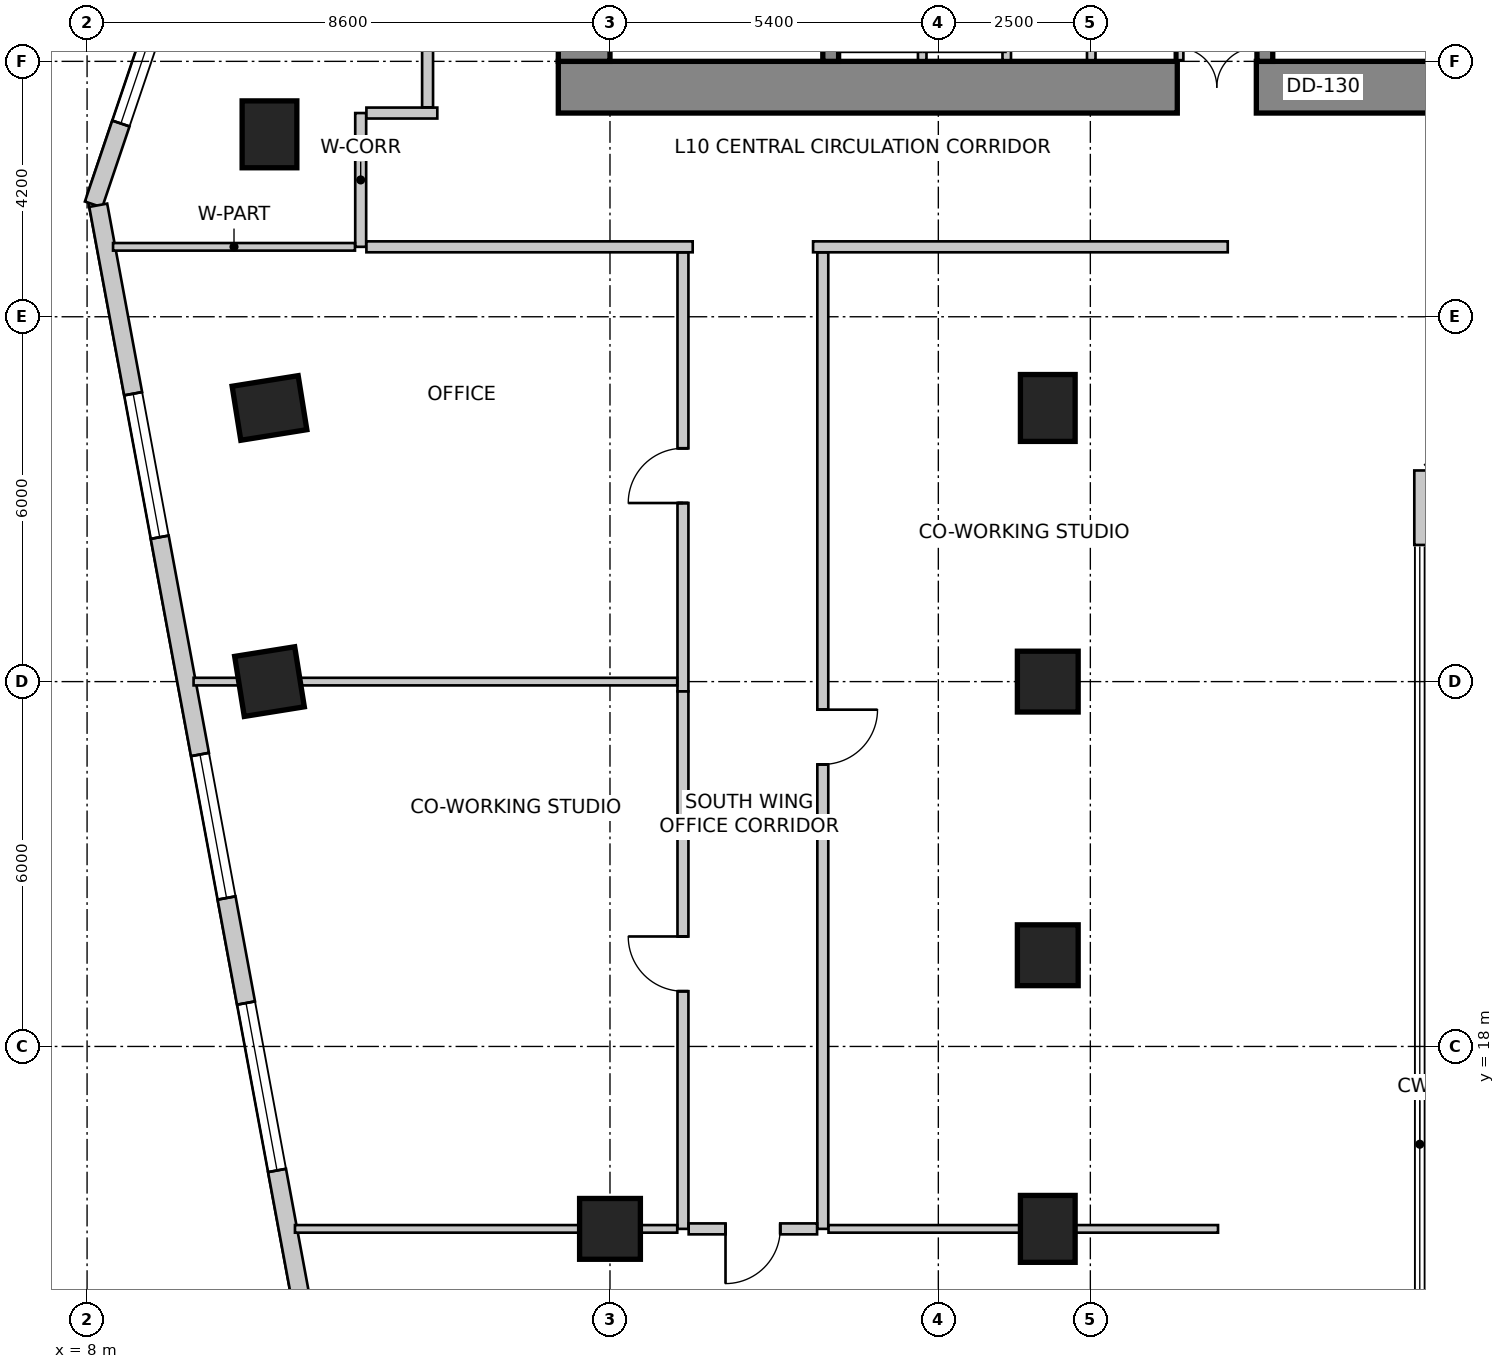
"""IFC4 building model, lengths in metres.
Left out: names, types, materials, properties, quantities, classifications, styles, units other than length and angle.
Written with IfcOpenShell. Run it as: python <this file> out.ifc"""

import sys

from ifc_helpers import new_model, si_unit, direction, frame, frame_2d, origin, origin_2d, place, context, subcontext, project, spatial, rectangle, extrude, source, transform, mapped, element, fill, save


model = new_model("IFC4")
c1 = context("Model", 3, precision=1e-05, world=origin(), true_north=direction((0.0, 1.0)))
c2 = subcontext(c1, "Body", "Model", "MODEL_VIEW")
j1 = project(units=[si_unit("LENGTHUNIT", "METRE"), si_unit("PLANEANGLEUNIT", "RADIAN")], contexts=[c1])
p1 = place(None, origin())
s1 = spatial("IfcSite", under=j1, at=p1, CompositionType="ELEMENT")
p2 = place(p1, origin())
s2 = spatial("IfcBuilding", under=s1, at=p2, CompositionType="ELEMENT")
p3 = place(p2, frame((0.0, 0.0, 43.0)))
s3 = spatial("IfcBuildingStorey", under=s2, at=p3, CompositionType="ELEMENT", Elevation=43.0)
p4 = place(p3, frame((15.75, 33.775, 0.0), z_axis=(0.0, 0.0, 1.0), x_axis=(1.0, 0.0, 0.0)))
e1 = element("IfcWall", 1, at=p4, inside=s3, PredefinedType="SHEAR", context=c2, shape_type="SweptSolid", body=[
    extrude(rectangle(XDim=16.1, YDim=0.85, at=frame_2d((8.05, 0.0))), origin(), (0.0, 0.0, 1.0), 4.0),
])
m1 = source(origin(), c2, "Body", "SweptSolid", [
    extrude(rectangle(XDim=1.3, YDim=2.15, at=frame_2d((0.65, 1.075))), frame((0.0, 0.435, 0.0), z_axis=(0.0, -1.0, 0.0), x_axis=(1.0, 0.0, 0.0)), (0.0, 0.0, 1.0), 0.87),
])
p5 = place(p4, frame((10.18, 0.0, 0.0)))
e2 = element("IfcOpeningElement", 2, at=p5, cuts=e1, PredefinedType="OPENING", context=c2, shape_type="MappedRepresentation", body=[
    mapped(m1, transform((0.0, 0.0, 0.0), scale=1.0)),
])
p6 = place(p3, frame((16.175, 34.2, 0.0), z_axis=(0.0, 0.0, 1.0), x_axis=(0.0, 1.0, 0.0)))
e3 = element("IfcWall", 3, at=p6, inside=s3, PredefinedType="SHEAR", context=c2, shape_type="SweptSolid", body=[
    extrude(rectangle(XDim=11.4, YDim=0.85, at=frame_2d((5.7, 0.0))), origin(), (0.0, 0.0, 1.0), 4.0),
])
m2 = source(origin(), c2, "Body", "SweptSolid", [
    extrude(rectangle(XDim=1.1, YDim=2.15, at=frame_2d((0.55, 1.075))), frame((0.0, 0.435, 0.0), z_axis=(0.0, -1.0, 0.0), x_axis=(1.0, 0.0, 0.0)), (0.0, 0.0, 1.0), 0.87),
])
p7 = place(p6, frame((7.15, 0.0, 0.0)))
e4 = element("IfcOpeningElement", 4, at=p7, cuts=e3, PredefinedType="OPENING", context=c2, shape_type="MappedRepresentation", body=[
    mapped(m2, transform((0.0, 0.0, 0.0), scale=1.0)),
])
p8 = place(p3, frame((20.23, 34.2, 0.0), z_axis=(0.0, 0.0, 1.0), x_axis=(0.0, 1.0, 0.0)))
e5 = element("IfcWall", 5, at=p8, inside=s3, PredefinedType="SHEAR", context=c2, shape_type="SweptSolid", body=[
    extrude(rectangle(XDim=9.06, YDim=0.26, at=frame_2d((4.53, 0.0))), origin(), (0.0, 0.0, 1.0), 4.0),
])
m3 = source(origin(), c2, "Body", "SweptSolid", [
    extrude(rectangle(XDim=1.1, YDim=2.15, at=frame_2d((0.55, 1.075))), frame((0.0, 0.14, 0.0), z_axis=(0.0, -1.0, 0.0), x_axis=(1.0, 0.0, 0.0)), (0.0, 0.0, 1.0), 0.28),
])
p9 = place(p8, frame((7.45, 0.0, 0.0)))
e6 = element("IfcOpeningElement", 6, at=p9, cuts=e5, PredefinedType="OPENING", context=c2, shape_type="MappedRepresentation", body=[
    mapped(m3, transform((0.0, 0.0, 0.0), scale=1.0)),
])
p10 = place(p3, frame((27.37, 34.2, 0.0), z_axis=(0.0, 0.0, 1.0), x_axis=(0.0, 1.0, 0.0)))
e7 = element("IfcWall", 7, at=p10, inside=s3, PredefinedType="SHEAR", context=c2, shape_type="SweptSolid", body=[
    extrude(rectangle(XDim=9.06, YDim=0.26, at=frame_2d((4.53, 0.0))), origin(), (0.0, 0.0, 1.0), 4.0),
])
p11 = place(p10, frame((7.45, 0.0, 0.0)))
e8 = element("IfcOpeningElement", 8, at=p11, cuts=e7, PredefinedType="OPENING", context=c2, shape_type="MappedRepresentation", body=[
    mapped(m3, transform((0.0, 0.0, 0.0), scale=1.0)),
])
m4 = source(origin(), c2, "Body", "SweptSolid", [
    extrude(rectangle(XDim=0.9, YDim=1.1, at=origin_2d()), origin(), (0.0, 0.0, 1.0), 4.0),
])
for number, where, z_axis, x_axis in (
    (9, (11.0, 33.0, 0.0), (0.0, 0.0, 1.0), (1.0, 0.0, 0.0)),
    (10, (11.0, 28.5, 0.0), (0.0, 0.0, 1.0), (0.158, -0.987, 0.0)),
):
    element("IfcColumn", number, at=place(p3, frame(where, z_axis=z_axis, x_axis=x_axis)), inside=s3, PredefinedType="COLUMN", context=c2, shape_type="MappedRepresentation", body=[
        mapped(m4, transform((0.0, 0.0, 0.0), scale=1.0)),
    ])
m5 = source(origin(), c2, "Body", "SweptSolid", [
    extrude(rectangle(XDim=1.0, YDim=1.0, at=origin_2d()), origin(), (0.0, 0.0, 1.0), 4.0),
])
p12 = place(p3, frame((11.0, 24.0, 0.0), z_axis=(0.0, 0.0, 1.0), x_axis=(0.158158067254, -0.987413806751, 0.0)))
e11 = element("IfcColumn", 11, at=p12, inside=s3, PredefinedType="COLUMN", context=c2, shape_type="MappedRepresentation", body=[
    mapped(m5, transform((0.0, 0.0, 0.0), scale=1.0)),
])
p13 = place(p3, frame((23.8, 28.5, 0.0), z_axis=(0.0, 0.0, 1.0), x_axis=(1.0, 0.0, 0.0)))
e12 = element("IfcColumn", 12, at=p13, inside=s3, PredefinedType="COLUMN", context=c2, shape_type="MappedRepresentation", body=[
    mapped(m4, transform((0.0, 0.0, 0.0), scale=1.0)),
])
for number, where, z_axis, x_axis in (
    (13, (23.8, 24.0, 0.0), (0.0, 0.0, 1.0), (1.0, 0.0, 0.0)),
    (14, (23.8, 19.5, 0.0), (0.0, 0.0, 1.0), (1.0, 0.0, 0.0)),
):
    element("IfcColumn", number, at=place(p3, frame(where, z_axis=z_axis, x_axis=x_axis)), inside=s3, PredefinedType="COLUMN", context=c2, shape_type="MappedRepresentation", body=[
        mapped(m5, transform((0.0, 0.0, 0.0), scale=1.0)),
    ])
p14 = place(p3, frame((23.8, 15.0, 0.0), z_axis=(0.0, 0.0, 1.0), x_axis=(1.0, 0.0, 0.0)))
e15 = element("IfcColumn", 15, at=p14, inside=s3, PredefinedType="COLUMN", context=c2, shape_type="MappedRepresentation", body=[
    mapped(m4, transform((0.0, 0.0, 0.0), scale=1.0)),
])
p15 = place(p3, frame((16.6, 15.0, 0.0), z_axis=(0.0, 0.0, 1.0), x_axis=(1.0, 0.0, 0.0)))
e16 = element("IfcColumn", 16, at=p15, inside=s3, PredefinedType="COLUMN", context=c2, shape_type="MappedRepresentation", body=[
    mapped(m5, transform((0.0, 0.0, 0.0), scale=1.0)),
])
p16 = place(p3, frame((29.978, 26.247, 0.0), z_axis=(0.0, 0.0, 1.0), x_axis=(0.0, 1.0, 0.0)))
e17 = element("IfcWall", 17, at=p16, inside=s3, PredefinedType="SOLIDWALL", context=c2, shape_type="SweptSolid", body=[
    extrude(rectangle(XDim=1.225, YDim=0.3, at=frame_2d((0.613, 0.0))), origin(), (0.0, 0.0, 1.0), 3.75),
])
p17 = place(p3, frame((13.269, 47.134, 0.0), z_axis=(0.0, 0.0, 1.0), x_axis=(-0.319920423265, -0.947444416722, 0.0)))
e18 = element("IfcWall", 18, at=p17, inside=s3, PredefinedType="SOLIDWALL", context=c2, shape_type="SweptSolid", body=[
    extrude(rectangle(XDim=16.135, YDim=0.3, at=frame_2d((8.067, 0.0))), origin(), (0.0, 0.0, 1.0), 3.75),
])
m6 = source(origin(), c2, "Body", "SweptSolid", [
    extrude(rectangle(XDim=2.8, YDim=2.4, at=frame_2d((1.4, 1.2))), frame((0.0, 0.16, 0.0), z_axis=(0.0, -1.0, 0.0), x_axis=(1.0, 0.0, 0.0)), (0.0, 0.0, 1.0), 0.32),
])
p18 = place(p17, frame((1.988, 0.0, 0.85)))
e19 = element("IfcOpeningElement", 19, at=p18, cuts=e18, PredefinedType="OPENING", context=c2, shape_type="MappedRepresentation", body=[
    mapped(m6, transform((0.0, 0.0, 0.0), scale=1.0)),
])
m7 = source(origin(), c2, "Body", "SweptSolid", [
    extrude(rectangle(XDim=2.4, YDim=2.2, at=frame_2d((1.2, 1.1))), frame((0.0, 0.16, 0.0), z_axis=(0.0, -1.0, 0.0), x_axis=(1.0, 0.0, 0.0)), (0.0, 0.0, 1.0), 0.32),
])
p19 = place(p17, frame((7.159, 0.0, 0.85)))
e20 = element("IfcOpeningElement", 20, at=p19, cuts=e18, PredefinedType="OPENING", context=c2, shape_type="MappedRepresentation", body=[
    mapped(m7, transform((0.0, 0.0, 0.0), scale=1.0)),
])
p20 = place(p17, frame((11.93, 0.0, 0.85)))
e21 = element("IfcOpeningElement", 21, at=p20, cuts=e18, PredefinedType="OPENING", context=c2, shape_type="MappedRepresentation", body=[
    mapped(m6, transform((0.0, 0.0, 0.0), scale=1.0)),
])
p21 = place(p3, frame((8.183, 31.833, 0.0), z_axis=(0.0, 0.0, 1.0), x_axis=(0.18216364648, -0.983268226834, 0.0)))
e22 = element("IfcWall", 22, at=p21, inside=s3, PredefinedType="SOLIDWALL", context=c2, shape_type="SweptSolid", body=[
    extrude(rectangle(XDim=26.678, YDim=0.3, at=frame_2d((13.339, 0.0))), origin(), (0.0, 0.0, 1.0), 3.75),
])
p22 = place(p21, frame((3.152, 0.0, 0.85)))
e23 = element("IfcOpeningElement", 23, at=p22, cuts=e22, PredefinedType="OPENING", context=c2, shape_type="MappedRepresentation", body=[
    mapped(m7, transform((0.0, 0.0, 0.0), scale=1.0)),
])
p23 = place(p21, frame((9.186, 0.0, 0.85)))
e24 = element("IfcOpeningElement", 24, at=p23, cuts=e22, PredefinedType="OPENING", context=c2, shape_type="MappedRepresentation", body=[
    mapped(m7, transform((0.0, 0.0, 0.0), scale=1.0)),
])
p24 = place(p21, frame((13.343, 0.0, 0.85)))
e25 = element("IfcOpeningElement", 25, at=p24, cuts=e22, PredefinedType="OPENING", context=c2, shape_type="MappedRepresentation", body=[
    mapped(m6, transform((0.0, 0.0, 0.0), scale=1.0)),
])
p25 = place(p21, frame((18.411, 0.0, 0.85)))
e26 = element("IfcOpeningElement", 26, at=p25, cuts=e22, PredefinedType="OPENING", context=c2, shape_type="MappedRepresentation", body=[
    mapped(m7, transform((0.0, 0.0, 0.0), scale=1.0)),
])
p26 = place(p21, frame((22.709, 0.0, 0.85)))
e27 = element("IfcOpeningElement", 27, at=p26, cuts=e22, PredefinedType="OPENING", context=c2, shape_type="MappedRepresentation", body=[
    mapped(m6, transform((0.0, 0.0, 0.0), scale=1.0)),
])
for number, where, z_axis, x_axis in (
    (28, (25.96, 34.22, 0.0), (0.0, 0.0, 1.0), (0.0, 1.0, 0.0)),
    (29, (21.735, 34.22, 0.0), (0.0, 0.0, 1.0), (0.0, 1.0, 0.0)),
    (30, (23.125, 34.22, 0.0), (0.0, 0.0, 1.0), (0.0, 1.0, 0.0)),
    (31, (24.515, 34.22, 0.0), (0.0, 0.0, 1.0), (0.0, 1.0, 0.0)),
):
    element("IfcWall", number, at=place(p3, frame(where, z_axis=z_axis, x_axis=x_axis)), inside=s3, PredefinedType="SOLIDWALL", context=c2, shape_type="SweptSolid", body=[
        extrude(rectangle(XDim=1.62, YDim=0.14, at=frame_2d((0.81, 0.0))), origin(), (0.0, 0.0, 1.0), 3.042),
    ])
p27 = place(p3, frame((12.5, 31.15, 0.0), z_axis=(0.0, 0.0, 1.0), x_axis=(0.0, 1.0, 0.0)))
e32 = element("IfcWall", 32, at=p27, inside=s3, PredefinedType="PARTITIONING", context=c2, shape_type="SweptSolid", body=[
    extrude(rectangle(XDim=2.2, YDim=0.18, at=frame_2d((1.1, 0.0))), origin(), (0.0, 0.0, 1.0), 3.419),
])
p28 = place(p3, frame((12.594, 33.35, 0.0), z_axis=(0.0, 0.0, 1.0), x_axis=(1.0, 0.0, 0.0)))
e33 = element("IfcWall", 33, at=p28, inside=s3, PredefinedType="PARTITIONING", context=c2, shape_type="SweptSolid", body=[
    extrude(rectangle(XDim=1.166, YDim=0.18, at=frame_2d((0.583, 0.0))), origin(), (0.0, 0.0, 1.0), 3.75),
])
p29 = place(p3, frame((17.96, 31.15, 0.0), z_axis=(0.0, 0.0, 1.0), x_axis=(-1.0, 0.0, 0.0)))
e34 = element("IfcWall", 34, at=p29, inside=s3, PredefinedType="PARTITIONING", context=c2, shape_type="SweptSolid", body=[
    extrude(rectangle(XDim=5.366, YDim=0.18, at=frame_2d((2.683, 0.0))), origin(), (0.0, 0.0, 1.0), 3.419),
])
p30 = place(p3, frame((26.76, 31.15, 0.0), z_axis=(0.0, 0.0, 1.0), x_axis=(-1.0, 0.0, 0.0)))
e35 = element("IfcWall", 35, at=p30, inside=s3, PredefinedType="PARTITIONING", context=c2, shape_type="SweptSolid", body=[
    extrude(rectangle(XDim=6.82, YDim=0.18, at=frame_2d((3.41, 0.0))), origin(), (0.0, 0.0, 1.0), 3.419),
])
p31 = place(p3, frame((13.6, 33.444, 0.0), z_axis=(0.0, 0.0, 1.0), x_axis=(0.0, 1.0, 0.0)))
e36 = element("IfcWall", 36, at=p31, inside=s3, PredefinedType="PARTITIONING", context=c2, shape_type="SweptSolid", body=[
    extrude(rectangle(XDim=13.896, YDim=0.18, at=frame_2d((6.948, 0.0))), origin(), (0.0, 0.0, 1.0), 2.892),
])
m8 = source(origin(), c2, "Body", "SweptSolid", [
    extrude(rectangle(XDim=0.9, YDim=2.15, at=frame_2d((0.45, 1.075))), frame((0.0, 0.1, 0.0), z_axis=(0.0, -1.0, 0.0), x_axis=(1.0, 0.0, 0.0)), (0.0, 0.0, 1.0), 0.2),
])
p32 = place(p31, frame((4.144, 0.0, 0.0)))
e37 = element("IfcOpeningElement", 37, at=p32, cuts=e36, PredefinedType="OPENING", context=c2, shape_type="MappedRepresentation", body=[
    mapped(m8, transform((0.0, 0.0, 0.0), scale=1.0)),
])
p33 = place(p3, frame((12.406, 31.15, 0.0), z_axis=(0.0, 0.0, 1.0), x_axis=(-1.0, 0.0, 0.0)))
e38 = element("IfcWall", 38, at=p33, inside=s3, PredefinedType="PARTITIONING", context=c2, shape_type="SweptSolid", body=[
    extrude(rectangle(XDim=3.979, YDim=0.125, at=frame_2d((1.99, 0.0))), origin(), (0.0, 0.0, 1.0), 2.892),
])
p34 = place(p3, frame((17.8, 23.84, 0.0), z_axis=(0.0, 0.0, 1.0), x_axis=(0.0, 1.0, 0.0)))
e39 = element("IfcWall", 39, at=p34, inside=s3, PredefinedType="PARTITIONING", context=c2, shape_type="SweptSolid", body=[
    extrude(rectangle(XDim=7.216, YDim=0.18, at=frame_2d((3.608, 0.0))), origin(), (0.0, 0.0, 1.0), 3.125),
])
p35 = place(p34, frame((3.097, 0.0, 0.0)))
e40 = element("IfcOpeningElement", 40, at=p35, cuts=e39, PredefinedType="OPENING", context=c2, shape_type="MappedRepresentation", body=[
    mapped(m8, transform((0.0, 0.0, 0.0), scale=1.0)),
])
p36 = place(p3, frame((17.8, 15.0, 0.0), z_axis=(0.0, 0.0, 1.0), x_axis=(0.0, 1.0, 0.0)))
e41 = element("IfcWall", 41, at=p36, inside=s3, PredefinedType="PARTITIONING", context=c2, shape_type="SweptSolid", body=[
    extrude(rectangle(XDim=8.838, YDim=0.18, at=frame_2d((4.419, 0.0))), origin(), (0.0, 0.0, 1.0), 2.892),
])
p37 = place(p36, frame((3.908, 0.0, 0.0)))
e42 = element("IfcOpeningElement", 42, at=p37, cuts=e41, PredefinedType="OPENING", context=c2, shape_type="MappedRepresentation", body=[
    mapped(m8, transform((0.0, 0.0, 0.0), scale=1.0)),
])
p38 = place(p3, frame((20.1, 31.056, 0.0), z_axis=(0.0, 0.0, 1.0), x_axis=(0.0, -1.0, 0.0)))
e43 = element("IfcWall", 43, at=p38, inside=s3, PredefinedType="PARTITIONING", context=c2, shape_type="SweptSolid", body=[
    extrude(rectangle(XDim=16.056, YDim=0.18, at=frame_2d((8.028, 0.0))), origin(), (0.0, 0.0, 1.0), 2.892),
])
p39 = place(p38, frame((7.518, 0.0, 0.0)))
e44 = element("IfcOpeningElement", 44, at=p39, cuts=e43, PredefinedType="OPENING", context=c2, shape_type="MappedRepresentation", body=[
    mapped(m8, transform((0.0, 0.0, 0.0), scale=1.0)),
])
p40 = place(p3, frame((20.006, 15.0, 0.0), z_axis=(0.0, 0.0, 1.0), x_axis=(-1.0, 0.0, 0.0)))
e45 = element("IfcWall", 45, at=p40, inside=s3, PredefinedType="PARTITIONING", context=c2, shape_type="SweptSolid", body=[
    extrude(rectangle(XDim=2.112, YDim=0.18, at=frame_2d((1.056, 0.0))), origin(), (0.0, 0.0, 1.0), 2.892),
])
p41 = place(p40, frame((0.606, 0.0, 0.0)))
e46 = element("IfcOpeningElement", 46, at=p41, cuts=e45, PredefinedType="OPENING", context=c2, shape_type="MappedRepresentation", body=[
    mapped(m8, transform((0.0, 0.0, 0.0), scale=1.0)),
])
p42 = place(p3, frame((17.706, 24.0, 0.0), z_axis=(0.0, 0.0, 1.0), x_axis=(-1.0, 0.0, 0.0)))
e47 = element("IfcWall", 47, at=p42, inside=s3, PredefinedType="PARTITIONING", context=c2, shape_type="SweptSolid", body=[
    extrude(rectangle(XDim=7.954, YDim=0.125, at=frame_2d((3.977, 0.0))), origin(), (0.0, 0.0, 1.0), 2.892),
])
p43 = place(p3, frame((17.706, 15.0, 0.0), z_axis=(0.0, 0.0, 1.0), x_axis=(-1.0, 0.0, 0.0)))
e48 = element("IfcWall", 48, at=p43, inside=s3, PredefinedType="PARTITIONING", context=c2, shape_type="SweptSolid", body=[
    extrude(rectangle(XDim=6.287, YDim=0.125, at=frame_2d((3.144, 0.0))), origin(), (0.0, 0.0, 1.0), 2.892),
])
p44 = place(p3, frame((26.6, 15.0, 0.0), z_axis=(0.0, 0.0, 1.0), x_axis=(-1.0, 0.0, 0.0)))
e49 = element("IfcWall", 49, at=p44, inside=s3, PredefinedType="PARTITIONING", context=c2, shape_type="SweptSolid", body=[
    extrude(rectangle(XDim=6.406, YDim=0.125, at=frame_2d((3.203, 0.0))), origin(), (0.0, 0.0, 1.0), 2.892),
])
m9 = source(origin(), c2, "Body", "SweptSolid", [
    extrude(rectangle(XDim=2.8, YDim=2.4, at=frame_2d((1.4, 1.2))), frame((0.0, -0.015, 0.0), z_axis=(0.0, -1.0, 0.0), x_axis=(1.0, 0.0, 0.0)), (0.0, 0.0, 1.0), 0.06),
])
p45 = place(p20, origin())
e50 = element("IfcWindow", 50, at=p45, inside=s3, PartitioningType="SINGLE_PANEL", PredefinedType="WINDOW", context=c2, shape_type="MappedRepresentation", body=[
    mapped(m9, transform((0.0, 0.0, 0.0), scale=1.0)),
])
fill(e21, e50)
m10 = source(origin(), c2, "Body", "SweptSolid", [
    extrude(rectangle(XDim=2.4, YDim=2.2, at=frame_2d((1.2, 1.1))), frame((0.0, -0.015, 0.0), z_axis=(0.0, -1.0, 0.0), x_axis=(1.0, 0.0, 0.0)), (0.0, 0.0, 1.0), 0.06),
])
p46 = place(p22, origin())
e51 = element("IfcWindow", 51, at=p46, inside=s3, PartitioningType="SINGLE_PANEL", PredefinedType="WINDOW", context=c2, shape_type="MappedRepresentation", body=[
    mapped(m10, transform((0.0, 0.0, 0.0), scale=1.0)),
])
fill(e23, e51)
p47 = place(p23, origin())
e52 = element("IfcWindow", 52, at=p47, inside=s3, PartitioningType="SINGLE_PANEL", PredefinedType="WINDOW", context=c2, shape_type="MappedRepresentation", body=[
    mapped(m10, transform((0.0, 0.0, 0.0), scale=1.0)),
])
fill(e24, e52)
p48 = place(p24, origin())
e53 = element("IfcWindow", 53, at=p48, inside=s3, PartitioningType="SINGLE_PANEL", PredefinedType="WINDOW", context=c2, shape_type="MappedRepresentation", body=[
    mapped(m9, transform((0.0, 0.0, 0.0), scale=1.0)),
])
fill(e25, e53)
m11 = source(origin(), c2, "Body", "SweptSolid", [
    extrude(rectangle(XDim=1.3, YDim=2.15, at=frame_2d((0.65, 1.075))), frame((0.0, 0.025, 0.0), z_axis=(0.0, -1.0, 0.0), x_axis=(1.0, 0.0, 0.0)), (0.0, 0.0, 1.0), 0.05),
])
p49 = place(p5, origin())
e54 = element("IfcDoor", 54, at=p49, inside=s3, OperationType="DOUBLE_DOOR_SINGLE_SWING", PredefinedType="DOOR", context=c2, shape_type="MappedRepresentation", body=[
    mapped(m11, transform((0.0, 0.0, 0.0), scale=1.0)),
])
fill(e2, e54)
m12 = source(origin(), c2, "Body", "SweptSolid", [
    extrude(rectangle(XDim=0.9, YDim=2.15, at=frame_2d((0.45, 1.075))), frame((0.0, 0.025, 0.0), z_axis=(0.0, -1.0, 0.0), x_axis=(1.0, 0.0, 0.0)), (0.0, 0.0, 1.0), 0.05),
])
p50 = place(p35, origin())
e55 = element("IfcDoor", 55, at=p50, inside=s3, OperationType="SINGLE_SWING_LEFT", PredefinedType="DOOR", context=c2, shape_type="MappedRepresentation", body=[
    mapped(m12, transform((0.0, 0.0, 0.0), scale=1.0)),
])
fill(e40, e55)
p51 = place(p37, origin())
e56 = element("IfcDoor", 56, at=p51, inside=s3, OperationType="SINGLE_SWING_RIGHT", PredefinedType="DOOR", context=c2, shape_type="MappedRepresentation", body=[
    mapped(m12, transform((0.0, 0.0, 0.0), scale=1.0)),
])
fill(e42, e56)
p52 = place(p39, origin())
e57 = element("IfcDoor", 57, at=p52, inside=s3, OperationType="SINGLE_SWING_LEFT", PredefinedType="DOOR", context=c2, shape_type="MappedRepresentation", body=[
    mapped(m12, transform((0.0, 0.0, 0.0), scale=1.0)),
])
fill(e44, e57)
p53 = place(p41, origin())
e58 = element("IfcDoor", 58, at=p53, inside=s3, OperationType="SINGLE_SWING_RIGHT", PredefinedType="DOOR", context=c2, shape_type="MappedRepresentation", body=[
    mapped(m12, transform((0.0, 0.0, 0.0), scale=1.0)),
])
fill(e46, e58)
save(model, sys.argv[1])
